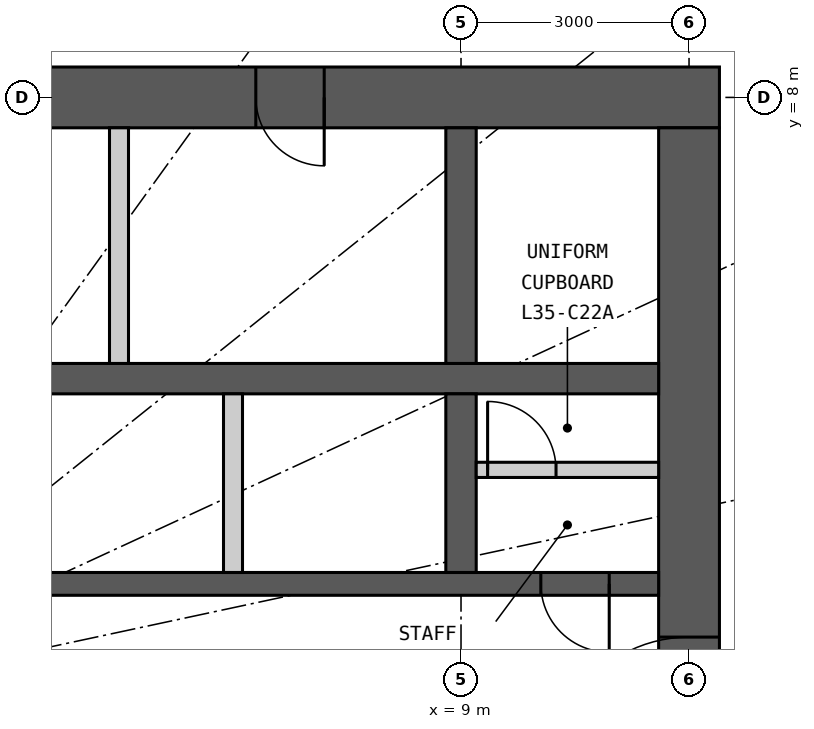
"""IFC4 building model, lengths in metres.
Left out: names, types, materials, properties, quantities, classifications, styles, units other than length and angle.
Written with IfcOpenShell. Run it as: python <this file> out.ifc"""

import sys

from ifc_helpers import new_model, si_unit, direction, frame, frame_2d, origin, place, context, subcontext, project, spatial, rectangle, extrude, element, fill, save


model = new_model("IFC4")
c1 = context("Model", 3, precision=1e-05, world=origin(), true_north=direction((0.0, 1.0)))
c2 = subcontext(c1, "Body", "Model", "MODEL_VIEW")
j1 = project(units=[si_unit("LENGTHUNIT", "METRE"), si_unit("PLANEANGLEUNIT", "RADIAN")], contexts=[c1])
p1 = place(None, origin())
s1 = spatial("IfcSite", under=j1, at=p1, CompositionType="ELEMENT")
p2 = place(p1, origin())
s2 = spatial("IfcBuilding", under=s1, at=p2, CompositionType="ELEMENT")
p3 = place(p2, frame((0.0, 0.0, 135.3)))
s3 = spatial("IfcBuildingStorey", under=s2, at=p3, CompositionType="ELEMENT", Elevation=135.3)
p4 = place(p3, frame((-12.4, 8.0, 0.0), z_axis=(0.0, 0.0, 1.0), x_axis=(1.0, 0.0, 0.0)))
e1 = element("IfcWall", 1, at=p4, inside=s3, PredefinedType="SHEAR", context=c2, shape_type="SweptSolid", body=[
    extrude(rectangle(XDim=24.8, YDim=0.8, at=frame_2d((12.4, 0.0))), origin(), (0.0, 0.0, 1.0), 3.3),
])
p5 = place(p4, frame((11.1, 0.0, 0.0)))
e2 = element("IfcOpeningElement", 2, at=p5, cuts=e1, PredefinedType="OPENING", context=c2, shape_type="SweptSolid", body=[
    extrude(rectangle(XDim=1.2, YDim=2.2, at=frame_2d((0.6, 1.1))), frame((0.0, 0.41, 0.0), z_axis=(0.0, -1.0, 0.0), x_axis=(1.0, 0.0, 0.0)), (0.0, 0.0, 1.0), 0.82),
])
p6 = place(p4, frame((18.7, 0.0, 0.0)))
e3 = element("IfcOpeningElement", 3, at=p6, cuts=e1, PredefinedType="OPENING", context=c2, shape_type="SweptSolid", body=[
    extrude(rectangle(XDim=0.9, YDim=2.2, at=frame_2d((0.45, 1.1))), frame((0.0, 0.41, 0.0), z_axis=(0.0, -1.0, 0.0), x_axis=(1.0, 0.0, 0.0)), (0.0, 0.0, 1.0), 0.82),
])
p7 = place(p3, frame((12.0, -7.6, 0.0), z_axis=(0.0, 0.0, 1.0), x_axis=(0.0, 1.0, 0.0)))
e4 = element("IfcWall", 4, at=p7, inside=s3, PredefinedType="SHEAR", context=c2, shape_type="SweptSolid", body=[
    extrude(rectangle(XDim=15.2, YDim=0.8, at=frame_2d((7.6, 0.0))), origin(), (0.0, 0.0, 1.0), 3.3),
])
p8 = place(p7, frame((6.7, 0.0, 0.0)))
e5 = element("IfcOpeningElement", 5, at=p8, cuts=e4, PredefinedType="OPENING", context=c2, shape_type="SweptSolid", body=[
    extrude(rectangle(XDim=1.8, YDim=2.2, at=frame_2d((0.9, 1.1))), frame((0.0, 0.41, 0.0), z_axis=(0.0, -1.0, 0.0), x_axis=(1.0, 0.0, 0.0)), (0.0, 0.0, 1.0), 0.82),
])
p9 = place(p3, frame((-11.6, 4.3, 0.0), z_axis=(0.0, 0.0, 1.0), x_axis=(1.0, 0.0, 0.0)))
e6 = element("IfcWall", 6, at=p9, inside=s3, PredefinedType="SHEAR", context=c2, shape_type="SweptSolid", body=[
    extrude(rectangle(XDim=23.2, YDim=0.4, at=frame_2d((11.6, 0.0))), origin(), (0.0, 0.0, 1.0), 3.3),
])
p10 = place(p3, frame((-11.6, 1.6, 0.0), z_axis=(0.0, 0.0, 1.0), x_axis=(1.0, 0.0, 0.0)))
e7 = element("IfcWall", 7, at=p10, inside=s3, PredefinedType="SHEAR", context=c2, shape_type="SweptSolid", body=[
    extrude(rectangle(XDim=23.2, YDim=0.3, at=frame_2d((11.6, 0.0))), origin(), (0.0, 0.0, 1.0), 3.3),
])
p11 = place(p10, frame((6.55, 0.0, 0.0)))
e8 = element("IfcOpeningElement", 8, at=p11, cuts=e7, PredefinedType="OPENING", context=c2, shape_type="SweptSolid", body=[
    extrude(rectangle(XDim=1.1, YDim=2.2, at=frame_2d((0.55, 1.1))), frame((0.0, 0.16, 0.0), z_axis=(0.0, -1.0, 0.0), x_axis=(1.0, 0.0, 0.0)), (0.0, 0.0, 1.0), 0.32),
])
p12 = place(p10, frame((0.65, 0.0, 0.0)))
e9 = element("IfcOpeningElement", 9, at=p12, cuts=e7, PredefinedType="OPENING", context=c2, shape_type="SweptSolid", body=[
    extrude(rectangle(XDim=0.9, YDim=2.2, at=frame_2d((0.45, 1.1))), frame((0.0, 0.16, 0.0), z_axis=(0.0, -1.0, 0.0), x_axis=(1.0, 0.0, 0.0)), (0.0, 0.0, 1.0), 0.32),
])
p13 = place(p10, frame((21.65, 0.0, 0.0)))
e10 = element("IfcOpeningElement", 10, at=p13, cuts=e7, PredefinedType="OPENING", context=c2, shape_type="SweptSolid", body=[
    extrude(rectangle(XDim=0.9, YDim=2.2, at=frame_2d((0.45, 1.1))), frame((0.0, 0.16, 0.0), z_axis=(0.0, -1.0, 0.0), x_axis=(1.0, 0.0, 0.0)), (0.0, 0.0, 1.0), 0.32),
])
p14 = place(p10, frame((3.65, 0.0, 0.0)))
e11 = element("IfcOpeningElement", 11, at=p14, cuts=e7, PredefinedType="OPENING", context=c2, shape_type="SweptSolid", body=[
    extrude(rectangle(XDim=0.9, YDim=2.2, at=frame_2d((0.45, 1.1))), frame((0.0, 0.16, 0.0), z_axis=(0.0, -1.0, 0.0), x_axis=(1.0, 0.0, 0.0)), (0.0, 0.0, 1.0), 0.32),
])
p15 = place(p3, frame((9.0, 4.5, 0.0), z_axis=(0.0, 0.0, 1.0), x_axis=(0.0, 1.0, 0.0)))
e12 = element("IfcWall", 12, at=p15, inside=s3, PredefinedType="SHEAR", context=c2, shape_type="SweptSolid", body=[
    extrude(rectangle(XDim=3.1, YDim=0.4, at=frame_2d((1.55, 0.0))), origin(), (0.0, 0.0, 1.0), 3.3),
])
p16 = place(p3, frame((9.0, 1.75, 0.0), z_axis=(0.0, 0.0, 1.0), x_axis=(0.0, 1.0, 0.0)))
e13 = element("IfcWall", 13, at=p16, inside=s3, PredefinedType="SHEAR", context=c2, shape_type="SweptSolid", body=[
    extrude(rectangle(XDim=2.35, YDim=0.4, at=frame_2d((1.175, 0.0))), origin(), (0.0, 0.0, 1.0), 3.3),
])
p17 = place(p3, frame((4.5, 4.5, 0.0), z_axis=(0.0, 0.0, 1.0), x_axis=(0.0, 1.0, 0.0)))
e14 = element("IfcWall", 14, at=p17, inside=s3, PredefinedType="PARTITIONING", context=c2, shape_type="SweptSolid", body=[
    extrude(rectangle(XDim=3.1, YDim=0.25, at=frame_2d((1.55, 0.0))), origin(), (0.0, 0.0, 1.0), 3.3),
])
p18 = place(p3, frame((6.0, 1.75, 0.0), z_axis=(0.0, 0.0, 1.0), x_axis=(0.0, 1.0, 0.0)))
e15 = element("IfcWall", 15, at=p18, inside=s3, PredefinedType="PARTITIONING", context=c2, shape_type="SweptSolid", body=[
    extrude(rectangle(XDim=2.35, YDim=0.25, at=frame_2d((1.175, 0.0))), origin(), (0.0, 0.0, 1.0), 3.3),
])
p19 = place(p3, frame((9.2, 3.1, 0.0), z_axis=(0.0, 0.0, 1.0), x_axis=(1.0, 0.0, 0.0)))
e16 = element("IfcWall", 16, at=p19, inside=s3, PredefinedType="PARTITIONING", context=c2, shape_type="SweptSolid", body=[
    extrude(rectangle(XDim=2.4, YDim=0.2, at=frame_2d((1.2, 0.0))), origin(), (0.0, 0.0, 1.0), 3.05),
])
p20 = place(p19, frame((0.15, 0.0, 0.0)))
e17 = element("IfcOpeningElement", 17, at=p20, cuts=e16, PredefinedType="OPENING", context=c2, shape_type="SweptSolid", body=[
    extrude(rectangle(XDim=0.9, YDim=2.2, at=frame_2d((0.45, 1.1))), frame((0.0, 0.11, 0.0), z_axis=(0.0, -1.0, 0.0), x_axis=(1.0, 0.0, 0.0)), (0.0, 0.0, 1.0), 0.22),
])
p21 = place(p6, origin())
e18 = element("IfcDoor", 18, at=p21, inside=s3, OperationType="SINGLE_SWING_RIGHT", PredefinedType="DOOR", context=c2, shape_type="SweptSolid", body=[
    extrude(rectangle(XDim=0.9, YDim=2.2, at=frame_2d((0.45, 1.1))), frame((0.0, 0.025, 0.0), z_axis=(0.0, -1.0, 0.0), x_axis=(1.0, 0.0, 0.0)), (0.0, 0.0, 1.0), 0.05),
])
fill(e3, e18)
p22 = place(p20, origin())
e19 = element("IfcDoor", 19, at=p22, inside=s3, OperationType="SINGLE_SWING_LEFT", PredefinedType="DOOR", context=c2, shape_type="SweptSolid", body=[
    extrude(rectangle(XDim=0.9, YDim=2.2, at=frame_2d((0.45, 1.1))), frame((0.0, 0.025, 0.0), z_axis=(0.0, -1.0, 0.0), x_axis=(1.0, 0.0, 0.0)), (0.0, 0.0, 1.0), 0.05),
])
fill(e17, e19)
p23 = place(p13, origin())
e20 = element("IfcDoor", 20, at=p23, inside=s3, OperationType="SINGLE_SWING_RIGHT", PredefinedType="DOOR", context=c2, shape_type="SweptSolid", body=[
    extrude(rectangle(XDim=0.9, YDim=2.2, at=frame_2d((0.45, 1.1))), frame((0.0, 0.025, 0.0), z_axis=(0.0, -1.0, 0.0), x_axis=(1.0, 0.0, 0.0)), (0.0, 0.0, 1.0), 0.05),
])
fill(e10, e20)
p24 = place(p8, origin())
e21 = element("IfcDoor", 21, at=p24, inside=s3, OperationType="DOUBLE_DOOR_DOUBLE_SWING", PredefinedType="DOOR", context=c2, shape_type="SweptSolid", body=[
    extrude(rectangle(XDim=1.8, YDim=2.2, at=frame_2d((0.9, 1.1))), frame((0.0, 0.025, 0.0), z_axis=(0.0, -1.0, 0.0), x_axis=(1.0, 0.0, 0.0)), (0.0, 0.0, 1.0), 0.05),
])
fill(e5, e21)
save(model, sys.argv[1])
